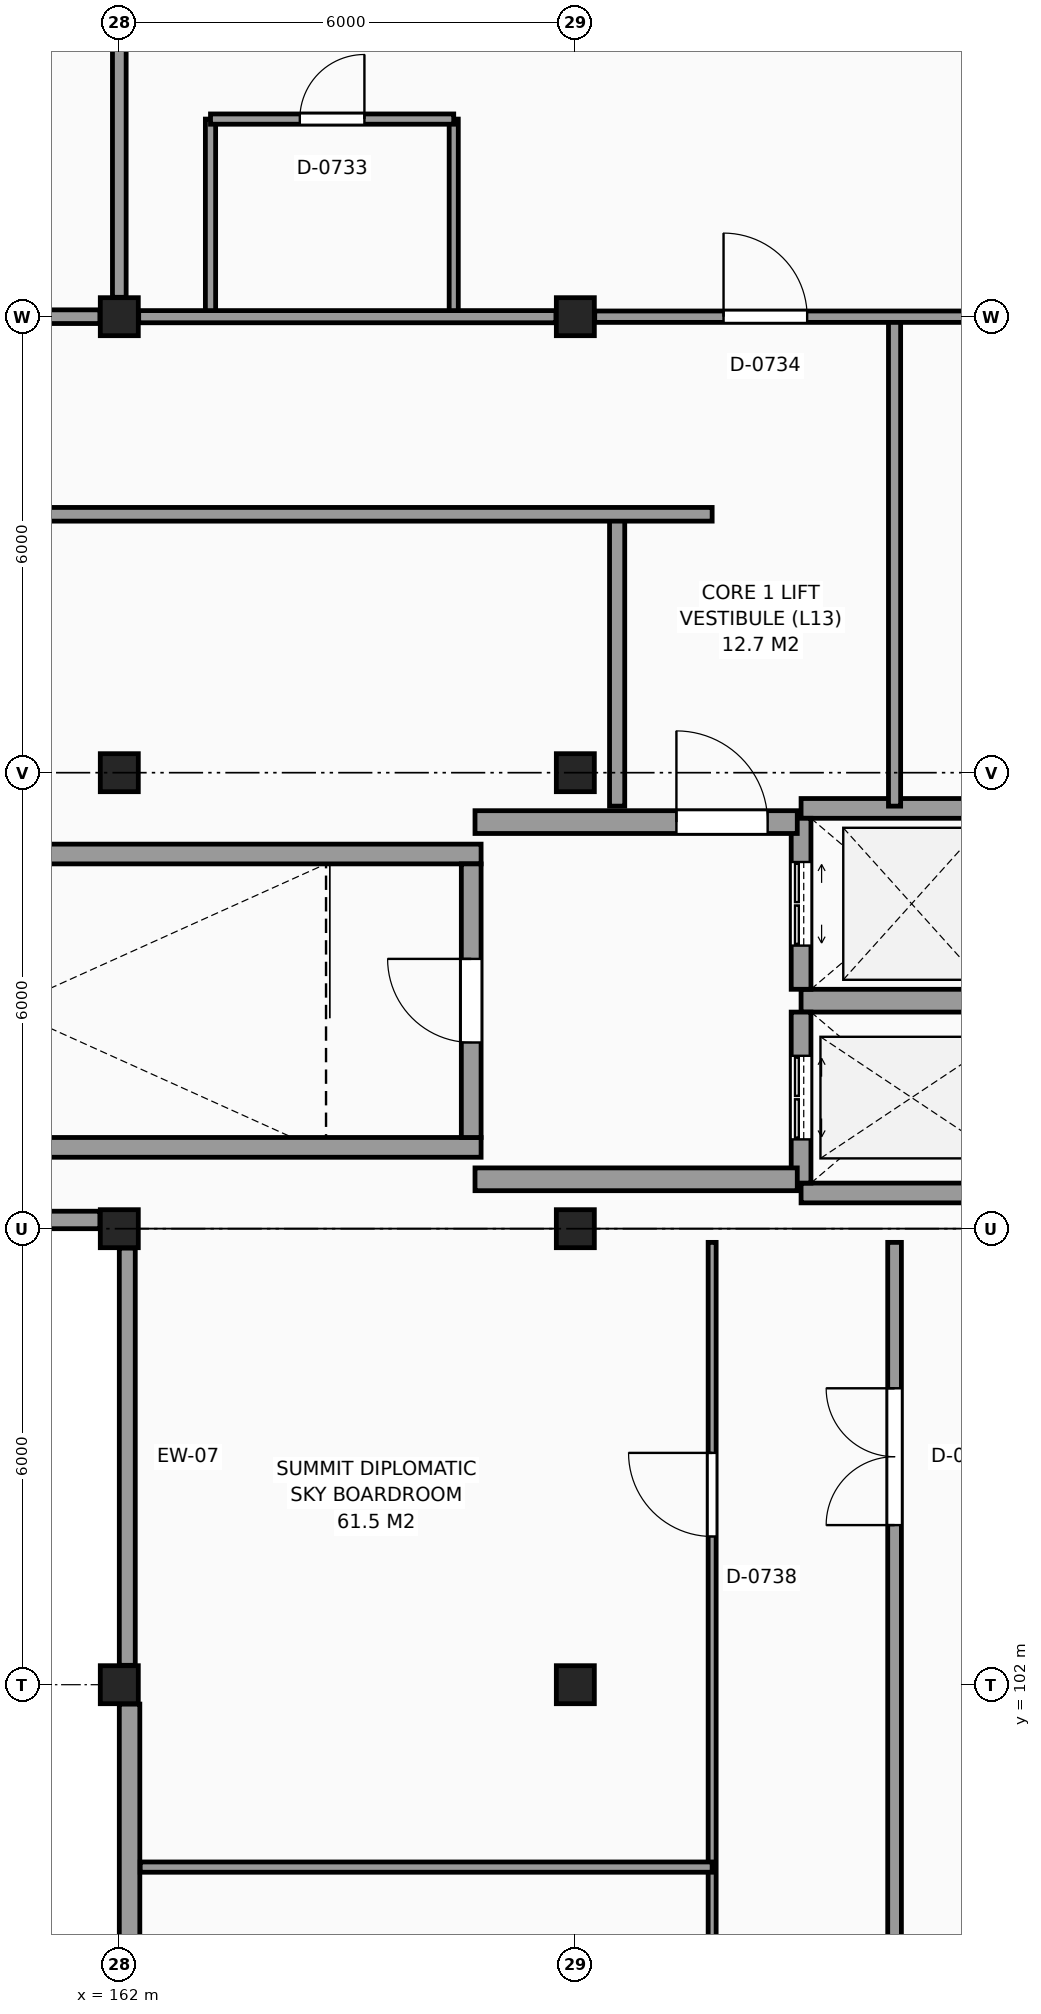
"""IFC4 building model, lengths in metres.
Left out: names, types, materials, properties, quantities, classifications, styles, units other than length and angle.
Written with IfcOpenShell. Run it as: python <this file> out.ifc"""

import sys

from ifc_helpers import new_model, si_unit, direction, frame, frame_2d, origin, origin_2d, place, context, subcontext, project, spatial, rectangle, extrude, element, fill, save


model = new_model("IFC4")
c1 = context("Model", 3, precision=1e-05, world=origin(), true_north=direction((0.0, 1.0)))
c2 = subcontext(c1, "Body", "Model", "MODEL_VIEW")
j1 = project(units=[si_unit("LENGTHUNIT", "METRE"), si_unit("PLANEANGLEUNIT", "RADIAN")], contexts=[c1])
p1 = place(None, origin())
s1 = spatial("IfcSite", under=j1, at=p1, CompositionType="ELEMENT")
p2 = place(p1, origin())
s2 = spatial("IfcBuilding", under=s1, at=p2, CompositionType="ELEMENT")
p3 = place(p2, frame((0.0, 0.0, 51.3)))
s3 = spatial("IfcBuildingStorey", under=s2, at=p3, CompositionType="ELEMENT", Elevation=51.3)
for number, where, z_axis, x_axis in (
    (1, (162.0, 102.0, 0.0), (0.0, 0.0, 1.0), (1.0, 0.0, 0.0)),
    (2, (162.0, 108.0, 0.0), (0.0, 0.0, 1.0), (1.0, 0.0, 0.0)),
    (3, (162.0, 114.0, 0.0), (0.0, 0.0, 1.0), (1.0, 0.0, 0.0)),
    (4, (162.0, 120.0, 0.0), (0.0, 0.0, 1.0), (1.0, 0.0, 0.0)),
    (5, (168.0, 102.0, 0.0), (0.0, 0.0, 1.0), (1.0, 0.0, 0.0)),
    (6, (168.0, 108.0, 0.0), (0.0, 0.0, 1.0), (1.0, 0.0, 0.0)),
    (7, (168.0, 114.0, 0.0), (0.0, 0.0, 1.0), (1.0, 0.0, 0.0)),
    (8, (168.0, 120.0, 0.0), (0.0, 0.0, 1.0), (1.0, 0.0, 0.0)),
):
    element("IfcColumn", number, at=place(p3, frame(where, z_axis=z_axis, x_axis=x_axis)), inside=s3, PredefinedType="COLUMN", context=c2, shape_type="SweptSolid", body=[
        extrude(rectangle(XDim=0.5, YDim=0.5, at=origin_2d()), origin(), (0.0, 0.0, 1.0), 3.3),
    ])
p4 = place(p3, frame((156.255, 108.115, 0.0), z_axis=(0.0, 0.0, 1.0), x_axis=(1.0, 0.0, 0.0)))
e9 = element("IfcWall", 9, at=p4, inside=s3, PredefinedType="SOLIDWALL", context=c2, shape_type="SweptSolid", body=[
    extrude(rectangle(XDim=5.49, YDim=0.23, at=frame_2d((2.745, 0.0))), origin(), (0.0, 0.0, 1.0), 2.51),
])
p5 = place(p3, frame((162.105, 107.745, 0.0), z_axis=(0.0, 0.0, 1.0), x_axis=(0.0, -1.0, 0.0)))
e10 = element("IfcWall", 10, at=p5, inside=s3, PredefinedType="SOLIDWALL", context=c2, shape_type="SweptSolid", body=[
    extrude(rectangle(XDim=5.49, YDim=0.21, at=frame_2d((2.745, 0.0))), origin(), (0.0, 0.0, 1.0), 2.61),
])
p6 = place(p3, frame((162.135, 101.745, 0.0), z_axis=(0.0, 0.0, 1.0), x_axis=(0.0, -1.0, 0.0)))
e11 = element("IfcWall", 11, at=p6, inside=s3, PredefinedType="SOLIDWALL", context=c2, shape_type="SweptSolid", body=[
    extrude(rectangle(XDim=5.49, YDim=0.27, at=frame_2d((2.745, 0.0))), origin(), (0.0, 0.0, 1.0), 2.46),
])
for number, where, z_axis, x_axis in (
    (12, (156.04, 109.07, 0.0), (0.0, 0.0, 1.0), (1.0, 0.0, 0.0)),
    (13, (156.04, 112.93, 0.0), (0.0, 0.0, 1.0), (1.0, 0.0, 0.0)),
):
    element("IfcWall", number, at=place(p3, frame(where, z_axis=z_axis, x_axis=x_axis)), inside=s3, PredefinedType="SHEAR", context=c2, shape_type="SweptSolid", body=[
        extrude(rectangle(XDim=10.72, YDim=0.26, at=frame_2d((5.36, 0.0))), origin(), (0.0, 0.0, 1.0), 3.3),
    ])
p7 = place(p3, frame((166.63, 109.2, 0.0), z_axis=(0.0, 0.0, 1.0), x_axis=(0.0, 1.0, 0.0)))
e14 = element("IfcWall", 14, at=p7, inside=s3, PredefinedType="SHEAR", context=c2, shape_type="SweptSolid", body=[
    extrude(rectangle(XDim=3.6, YDim=0.26, at=frame_2d((1.8, 0.0))), origin(), (0.0, 0.0, 1.0), 3.3),
])
p8 = place(p7, frame((1.25, 0.0, 0.0)))
e15 = element("IfcOpeningElement", 15, at=p8, cuts=e14, PredefinedType="OPENING", context=c2, shape_type="SweptSolid", body=[
    extrude(rectangle(XDim=1.1, YDim=2.15, at=frame_2d((0.55, 1.075))), frame((0.0, 0.14, 0.0), z_axis=(0.0, -1.0, 0.0), x_axis=(1.0, 0.0, 0.0)), (0.0, 0.0, 1.0), 0.28),
])
p9 = place(p3, frame((170.97, 108.47, 0.0), z_axis=(0.0, 0.0, 1.0), x_axis=(1.0, 0.0, 0.0)))
e16 = element("IfcWall", 16, at=p9, inside=s3, PredefinedType="SHEAR", context=c2, shape_type="SweptSolid", body=[
    extrude(rectangle(XDim=2.91, YDim=0.26, at=frame_2d((1.455, 0.0))), origin(), (0.0, 0.0, 1.0), 3.3),
])
p10 = place(p3, frame((170.97, 111.0, 0.0), z_axis=(0.0, 0.0, 1.0), x_axis=(1.0, 0.0, 0.0)))
e17 = element("IfcWall", 17, at=p10, inside=s3, PredefinedType="SHEAR", context=c2, shape_type="SweptSolid", body=[
    extrude(rectangle(XDim=2.91, YDim=0.3, at=frame_2d((1.455, 0.0))), origin(), (0.0, 0.0, 1.0), 3.3),
])
p11 = place(p3, frame((170.97, 108.6, 0.0), z_axis=(0.0, 0.0, 1.0), x_axis=(0.0, 1.0, 0.0)))
e18 = element("IfcWall", 18, at=p11, inside=s3, PredefinedType="SHEAR", context=c2, shape_type="SweptSolid", body=[
    extrude(rectangle(XDim=2.25, YDim=0.26, at=frame_2d((1.125, 0.0))), origin(), (0.0, 0.0, 1.0), 3.3),
])
p12 = place(p11, frame((0.575, 0.0, 0.0)))
e19 = element("IfcOpeningElement", 19, at=p12, cuts=e18, PredefinedType="OPENING", context=c2, shape_type="SweptSolid", body=[
    extrude(rectangle(XDim=1.1, YDim=2.2, at=frame_2d((0.55, 1.1))), frame((0.0, 0.14, 0.0), z_axis=(0.0, -1.0, 0.0), x_axis=(1.0, 0.0, 0.0)), (0.0, 0.0, 1.0), 0.28),
])
p13 = place(p3, frame((170.97, 113.53, 0.0), z_axis=(0.0, 0.0, 1.0), x_axis=(1.0, 0.0, 0.0)))
e20 = element("IfcWall", 20, at=p13, inside=s3, PredefinedType="SHEAR", context=c2, shape_type="SweptSolid", body=[
    extrude(rectangle(XDim=2.91, YDim=0.26, at=frame_2d((1.455, 0.0))), origin(), (0.0, 0.0, 1.0), 3.3),
])
p14 = place(p3, frame((170.97, 111.15, 0.0), z_axis=(0.0, 0.0, 1.0), x_axis=(0.0, 1.0, 0.0)))
e21 = element("IfcWall", 21, at=p14, inside=s3, PredefinedType="SHEAR", context=c2, shape_type="SweptSolid", body=[
    extrude(rectangle(XDim=2.25, YDim=0.26, at=frame_2d((1.125, 0.0))), origin(), (0.0, 0.0, 1.0), 3.3),
])
p15 = place(p14, frame((0.575, 0.0, 0.0)))
e22 = element("IfcOpeningElement", 22, at=p15, cuts=e21, PredefinedType="OPENING", context=c2, shape_type="SweptSolid", body=[
    extrude(rectangle(XDim=1.1, YDim=2.2, at=frame_2d((0.55, 1.1))), frame((0.0, 0.14, 0.0), z_axis=(0.0, -1.0, 0.0), x_axis=(1.0, 0.0, 0.0)), (0.0, 0.0, 1.0), 0.28),
])
p16 = place(p3, frame((166.68, 113.35, 0.0), z_axis=(0.0, 0.0, 1.0), x_axis=(1.0, 0.0, 0.0)))
e23 = element("IfcWall", 23, at=p16, inside=s3, PredefinedType="SHEAR", context=c2, shape_type="SweptSolid", body=[
    extrude(rectangle(XDim=4.24, YDim=0.3, at=frame_2d((2.12, 0.0))), origin(), (0.0, 0.0, 1.0), 3.3),
])
p17 = place(p16, frame((2.65, 0.0, 0.0)))
e24 = element("IfcOpeningElement", 24, at=p17, cuts=e23, PredefinedType="OPENING", context=c2, shape_type="SweptSolid", body=[
    extrude(rectangle(XDim=1.2, YDim=2.2, at=frame_2d((0.6, 1.1))), frame((0.0, 0.16, 0.0), z_axis=(0.0, -1.0, 0.0), x_axis=(1.0, 0.0, 0.0)), (0.0, 0.0, 1.0), 0.32),
])
p18 = place(p3, frame((166.68, 108.65, 0.0), z_axis=(0.0, 0.0, 1.0), x_axis=(1.0, 0.0, 0.0)))
e25 = element("IfcWall", 25, at=p18, inside=s3, PredefinedType="SHEAR", context=c2, shape_type="SweptSolid", body=[
    extrude(rectangle(XDim=4.24, YDim=0.3, at=frame_2d((2.12, 0.0))), origin(), (0.0, 0.0, 1.0), 3.3),
])
p19 = place(p3, frame((162.0, 120.255, 0.0), z_axis=(0.0, 0.0, 1.0), x_axis=(0.0, 1.0, 0.0)))
e26 = element("IfcWall", 26, at=p19, inside=s3, PredefinedType="PARTITIONING", context=c2, shape_type="SweptSolid", body=[
    extrude(rectangle(XDim=5.465, YDim=0.18, at=frame_2d((2.732, 0.0))), origin(), (0.0, 0.0, 1.0), 2.46),
])
p20 = place(p3, frame((163.2, 120.0, 0.0), z_axis=(0.0, 0.0, 1.0), x_axis=(0.0, 1.0, 0.0)))
e27 = element("IfcWall", 27, at=p20, inside=s3, PredefinedType="PARTITIONING", context=c2, shape_type="SweptSolid", body=[
    extrude(rectangle(XDim=2.6, YDim=0.135, at=frame_2d((1.3, 0.0))), origin(), (0.0, 0.0, 1.0), 3.06),
])
p21 = place(p3, frame((166.4, 120.0, 0.0), z_axis=(0.0, 0.0, 1.0), x_axis=(0.0, 1.0, 0.0)))
e28 = element("IfcWall", 28, at=p21, inside=s3, PredefinedType="PARTITIONING", context=c2, shape_type="SweptSolid", body=[
    extrude(rectangle(XDim=2.6, YDim=0.12, at=frame_2d((1.3, 0.0))), origin(), (0.0, 0.0, 1.0), 3.06),
])
p22 = place(p3, frame((168.55, 113.56, 0.0), z_axis=(0.0, 0.0, 1.0), x_axis=(0.0, 1.0, 0.0)))
e29 = element("IfcWall", 29, at=p22, inside=s3, PredefinedType="PARTITIONING", context=c2, shape_type="SweptSolid", body=[
    extrude(rectangle(XDim=3.84, YDim=0.2, at=frame_2d((1.92, 0.0))), origin(), (0.0, 0.0, 1.0), 3.06),
])
p23 = place(p3, frame((169.8, 66.215, 0.0), z_axis=(0.0, 0.0, 1.0), x_axis=(0.0, 1.0, 0.0)))
e30 = element("IfcWall", 30, at=p23, inside=s3, PredefinedType="PARTITIONING", context=c2, shape_type="SweptSolid", body=[
    extrude(rectangle(XDim=41.605, YDim=0.105, at=frame_2d((20.802, 0.0))), origin(), (0.0, 0.0, 1.0), 3.06),
])
p24 = place(p23, frame((26.185, 0.0, 0.0)))
e31 = element("IfcOpeningElement", 31, at=p24, cuts=e30, PredefinedType="OPENING", context=c2, shape_type="SweptSolid", body=[
    extrude(rectangle(XDim=1.2, YDim=2.2, at=frame_2d((0.6, 1.1))), frame((0.0, 0.062, 0.0), z_axis=(0.0, -1.0, 0.0), x_axis=(1.0, 0.0, 0.0)), (0.0, 0.0, 1.0), 0.125),
])
p25 = place(p23, frame((8.235, 0.0, 0.0)))
e32 = element("IfcOpeningElement", 32, at=p25, cuts=e30, PredefinedType="OPENING", context=c2, shape_type="SweptSolid", body=[
    extrude(rectangle(XDim=1.1, YDim=2.2, at=frame_2d((0.55, 1.1))), frame((0.0, 0.062, 0.0), z_axis=(0.0, -1.0, 0.0), x_axis=(1.0, 0.0, 0.0)), (0.0, 0.0, 1.0), 0.125),
])
p26 = place(p23, frame((37.735, 0.0, 0.0)))
e33 = element("IfcOpeningElement", 33, at=p26, cuts=e30, PredefinedType="OPENING", context=c2, shape_type="SweptSolid", body=[
    extrude(rectangle(XDim=1.1, YDim=2.2, at=frame_2d((0.55, 1.1))), frame((0.0, 0.062, 0.0), z_axis=(0.0, -1.0, 0.0), x_axis=(1.0, 0.0, 0.0)), (0.0, 0.0, 1.0), 0.125),
])
p27 = place(p23, frame((31.085, 0.0, 0.0)))
e34 = element("IfcOpeningElement", 34, at=p27, cuts=e30, PredefinedType="OPENING", context=c2, shape_type="SweptSolid", body=[
    extrude(rectangle(XDim=1.0, YDim=2.15, at=frame_2d((0.5, 1.075))), frame((0.0, 0.062, 0.0), z_axis=(0.0, -1.0, 0.0), x_axis=(1.0, 0.0, 0.0)), (0.0, 0.0, 1.0), 0.125),
])
p28 = place(p3, frame((172.2, 66.215, 0.0), z_axis=(0.0, 0.0, 1.0), x_axis=(0.0, 1.0, 0.0)))
e35 = element("IfcWall", 35, at=p28, inside=s3, PredefinedType="PARTITIONING", context=c2, shape_type="SweptSolid", body=[
    extrude(rectangle(XDim=41.605, YDim=0.18, at=frame_2d((20.802, 0.0))), origin(), (0.0, 0.0, 1.0), 3.06),
])
p29 = place(p28, frame((37.885, 0.0, 0.0)))
e36 = element("IfcOpeningElement", 36, at=p29, cuts=e35, PredefinedType="OPENING", context=c2, shape_type="SweptSolid", body=[
    extrude(rectangle(XDim=1.8, YDim=2.35, at=frame_2d((0.9, 1.175))), frame((0.0, 0.1, 0.0), z_axis=(0.0, -1.0, 0.0), x_axis=(1.0, 0.0, 0.0)), (0.0, 0.0, 1.0), 0.2),
])
p30 = place(p28, frame((14.235, 0.0, 0.0)))
e37 = element("IfcOpeningElement", 37, at=p30, cuts=e35, PredefinedType="OPENING", context=c2, shape_type="SweptSolid", body=[
    extrude(rectangle(XDim=1.1, YDim=2.15, at=frame_2d((0.55, 1.075))), frame((0.0, 0.1, 0.0), z_axis=(0.0, -1.0, 0.0), x_axis=(1.0, 0.0, 0.0)), (0.0, 0.0, 1.0), 0.2),
])
p31 = place(p3, frame((172.2, 113.56, 0.0), z_axis=(0.0, 0.0, 1.0), x_axis=(0.0, 1.0, 0.0)))
e38 = element("IfcWall", 38, at=p31, inside=s3, PredefinedType="PARTITIONING", context=c2, shape_type="SweptSolid", body=[
    extrude(rectangle(XDim=6.44, YDim=0.16, at=frame_2d((3.22, 0.0))), origin(), (0.0, 0.0, 1.0), 3.06),
])
p32 = place(p3, frame((162.275, 99.6, 0.0), z_axis=(0.0, 0.0, 1.0), x_axis=(1.0, 0.0, 0.0)))
e39 = element("IfcWall", 39, at=p32, inside=s3, PredefinedType="PARTITIONING", context=c2, shape_type="SweptSolid", body=[
    extrude(rectangle(XDim=7.525, YDim=0.135, at=frame_2d((3.763, 0.0))), origin(), (0.0, 0.0, 1.0), 3.06),
])
p33 = place(p3, frame((102.215, 117.4, 0.0), z_axis=(0.0, 0.0, 1.0), x_axis=(1.0, 0.0, 0.0)))
e40 = element("IfcWall", 40, at=p33, inside=s3, PredefinedType="PARTITIONING", context=c2, shape_type="SweptSolid", body=[
    extrude(rectangle(XDim=67.585, YDim=0.18, at=frame_2d((33.792, 0.0))), origin(), (0.0, 0.0, 1.0), 3.06),
])
p34 = place(p33, frame((44.185, 0.0, 0.0)))
e41 = element("IfcOpeningElement", 41, at=p34, cuts=e40, PredefinedType="OPENING", context=c2, shape_type="SweptSolid", body=[
    extrude(rectangle(XDim=1.2, YDim=2.2, at=frame_2d((0.6, 1.1))), frame((0.0, 0.1, 0.0), z_axis=(0.0, -1.0, 0.0), x_axis=(1.0, 0.0, 0.0)), (0.0, 0.0, 1.0), 0.2),
])
p35 = place(p33, frame((14.185, 0.0, 0.0)))
e42 = element("IfcOpeningElement", 42, at=p35, cuts=e40, PredefinedType="OPENING", context=c2, shape_type="SweptSolid", body=[
    extrude(rectangle(XDim=1.2, YDim=2.2, at=frame_2d((0.6, 1.1))), frame((0.0, 0.1, 0.0), z_axis=(0.0, -1.0, 0.0), x_axis=(1.0, 0.0, 0.0)), (0.0, 0.0, 1.0), 0.2),
])
p36 = place(p33, frame((19.985, 0.0, 0.0)))
e43 = element("IfcOpeningElement", 43, at=p36, cuts=e40, PredefinedType="OPENING", context=c2, shape_type="SweptSolid", body=[
    extrude(rectangle(XDim=1.6, YDim=2.25, at=frame_2d((0.8, 1.125))), frame((0.0, 0.1, 0.0), z_axis=(0.0, -1.0, 0.0), x_axis=(1.0, 0.0, 0.0)), (0.0, 0.0, 1.0), 0.2),
])
p37 = place(p33, frame((50.335, 0.0, 0.0)))
e44 = element("IfcOpeningElement", 44, at=p37, cuts=e40, PredefinedType="OPENING", context=c2, shape_type="SweptSolid", body=[
    extrude(rectangle(XDim=0.9, YDim=2.1, at=frame_2d((0.45, 1.05))), frame((0.0, 0.1, 0.0), z_axis=(0.0, -1.0, 0.0), x_axis=(1.0, 0.0, 0.0)), (0.0, 0.0, 1.0), 0.2),
])
p38 = place(p3, frame((156.255, 120.0, 0.0), z_axis=(0.0, 0.0, 1.0), x_axis=(1.0, 0.0, 0.0)))
e45 = element("IfcWall", 45, at=p38, inside=s3, PredefinedType="PARTITIONING", context=c2, shape_type="SweptSolid", body=[
    extrude(rectangle(XDim=5.49, YDim=0.18, at=frame_2d((2.745, 0.0))), origin(), (0.0, 0.0, 1.0), 2.51),
])
p39 = place(p3, frame((162.255, 120.0, 0.0), z_axis=(0.0, 0.0, 1.0), x_axis=(1.0, 0.0, 0.0)))
e46 = element("IfcWall", 46, at=p39, inside=s3, PredefinedType="PARTITIONING", context=c2, shape_type="SweptSolid", body=[
    extrude(rectangle(XDim=5.49, YDim=0.16, at=frame_2d((2.745, 0.0))), origin(), (0.0, 0.0, 1.0), 2.62),
])
p40 = place(p3, frame((168.255, 120.0, 0.0), z_axis=(0.0, 0.0, 1.0), x_axis=(1.0, 0.0, 0.0)))
e47 = element("IfcWall", 47, at=p40, inside=s3, PredefinedType="PARTITIONING", context=c2, shape_type="SweptSolid", body=[
    extrude(rectangle(XDim=5.49, YDim=0.15, at=frame_2d((2.745, 0.0))), origin(), (0.0, 0.0, 1.0), 2.51),
])
p41 = place(p40, frame((1.695, 0.0, 0.0)))
e48 = element("IfcOpeningElement", 48, at=p41, cuts=e47, PredefinedType="OPENING", context=c2, shape_type="SweptSolid", body=[
    extrude(rectangle(XDim=1.1, YDim=2.2, at=frame_2d((0.55, 1.1))), frame((0.0, 0.085, 0.0), z_axis=(0.0, -1.0, 0.0), x_axis=(1.0, 0.0, 0.0)), (0.0, 0.0, 1.0), 0.17),
])
p42 = place(p3, frame((163.2, 122.6, 0.0), z_axis=(0.0, 0.0, 1.0), x_axis=(1.0, 0.0, 0.0)))
e49 = element("IfcWall", 49, at=p42, inside=s3, PredefinedType="PARTITIONING", context=c2, shape_type="SweptSolid", body=[
    extrude(rectangle(XDim=3.2, YDim=0.135, at=frame_2d((1.6, 0.0))), origin(), (0.0, 0.0, 1.0), 3.06),
])
p43 = place(p42, frame((1.175, 0.0, 0.0)))
e50 = element("IfcOpeningElement", 50, at=p43, cuts=e49, PredefinedType="OPENING", context=c2, shape_type="SweptSolid", body=[
    extrude(rectangle(XDim=0.85, YDim=2.1, at=frame_2d((0.425, 1.05))), frame((0.0, 0.078, 0.0), z_axis=(0.0, -1.0, 0.0), x_axis=(1.0, 0.0, 0.0)), (0.0, 0.0, 1.0), 0.155),
])
p44 = place(p8, origin())
e51 = element("IfcDoor", 51, at=p44, inside=s3, OperationType="SINGLE_SWING_RIGHT", PredefinedType="DOOR", context=c2, shape_type="SweptSolid", body=[
    extrude(rectangle(XDim=1.1, YDim=2.15, at=frame_2d((0.55, 1.075))), frame((0.0, 0.025, 0.0), z_axis=(0.0, -1.0, 0.0), x_axis=(1.0, 0.0, 0.0)), (0.0, 0.0, 1.0), 0.05),
])
fill(e15, e51)
p45 = place(p12, origin())
e52 = element("IfcDoor", 52, at=p45, inside=s3, OperationType="DOUBLE_DOOR_SLIDING", PredefinedType="DOOR", context=c2, shape_type="SweptSolid", body=[
    extrude(rectangle(XDim=1.1, YDim=2.2, at=frame_2d((0.55, 1.1))), frame((0.0, 0.025, 0.0), z_axis=(0.0, -1.0, 0.0), x_axis=(1.0, 0.0, 0.0)), (0.0, 0.0, 1.0), 0.05),
])
fill(e19, e52)
p46 = place(p15, origin())
e53 = element("IfcDoor", 53, at=p46, inside=s3, OperationType="DOUBLE_DOOR_SLIDING", PredefinedType="DOOR", context=c2, shape_type="SweptSolid", body=[
    extrude(rectangle(XDim=1.1, YDim=2.2, at=frame_2d((0.55, 1.1))), frame((0.0, 0.025, 0.0), z_axis=(0.0, -1.0, 0.0), x_axis=(1.0, 0.0, 0.0)), (0.0, 0.0, 1.0), 0.05),
])
fill(e22, e53)
p47 = place(p17, origin())
e54 = element("IfcDoor", 54, at=p47, inside=s3, OperationType="SINGLE_SWING_LEFT", PredefinedType="DOOR", context=c2, shape_type="SweptSolid", body=[
    extrude(rectangle(XDim=1.2, YDim=2.2, at=frame_2d((0.6, 1.1))), frame((0.0, 0.025, 0.0), z_axis=(0.0, -1.0, 0.0), x_axis=(1.0, 0.0, 0.0)), (0.0, 0.0, 1.0), 0.05),
])
fill(e24, e54)
p48 = place(p43, origin())
e55 = element("IfcDoor", 55, at=p48, inside=s3, OperationType="SINGLE_SWING_RIGHT", PredefinedType="DOOR", context=c2, shape_type="SweptSolid", body=[
    extrude(rectangle(XDim=0.85, YDim=2.1, at=frame_2d((0.425, 1.05))), frame((0.0, 0.025, 0.0), z_axis=(0.0, -1.0, 0.0), x_axis=(1.0, 0.0, 0.0)), (0.0, 0.0, 1.0), 0.05),
])
fill(e50, e55)
p49 = place(p41, origin())
e56 = element("IfcDoor", 56, at=p49, inside=s3, OperationType="SINGLE_SWING_LEFT", PredefinedType="DOOR", context=c2, shape_type="SweptSolid", body=[
    extrude(rectangle(XDim=1.1, YDim=2.2, at=frame_2d((0.55, 1.1))), frame((0.0, 0.025, 0.0), z_axis=(0.0, -1.0, 0.0), x_axis=(1.0, 0.0, 0.0)), (0.0, 0.0, 1.0), 0.05),
])
fill(e48, e56)
p50 = place(p29, origin())
e57 = element("IfcDoor", 57, at=p50, inside=s3, OperationType="DOUBLE_DOOR_SINGLE_SWING", PredefinedType="DOOR", context=c2, shape_type="SweptSolid", body=[
    extrude(rectangle(XDim=1.8, YDim=2.35, at=frame_2d((0.9, 1.175))), frame((0.0, 0.025, 0.0), z_axis=(0.0, -1.0, 0.0), x_axis=(1.0, 0.0, 0.0)), (0.0, 0.0, 1.0), 0.05),
])
fill(e36, e57)
p51 = place(p26, origin())
e58 = element("IfcDoor", 58, at=p51, inside=s3, OperationType="SINGLE_SWING_RIGHT", PredefinedType="DOOR", context=c2, shape_type="SweptSolid", body=[
    extrude(rectangle(XDim=1.1, YDim=2.2, at=frame_2d((0.55, 1.1))), frame((0.0, 0.025, 0.0), z_axis=(0.0, -1.0, 0.0), x_axis=(1.0, 0.0, 0.0)), (0.0, 0.0, 1.0), 0.05),
])
fill(e33, e58)
save(model, sys.argv[1])
